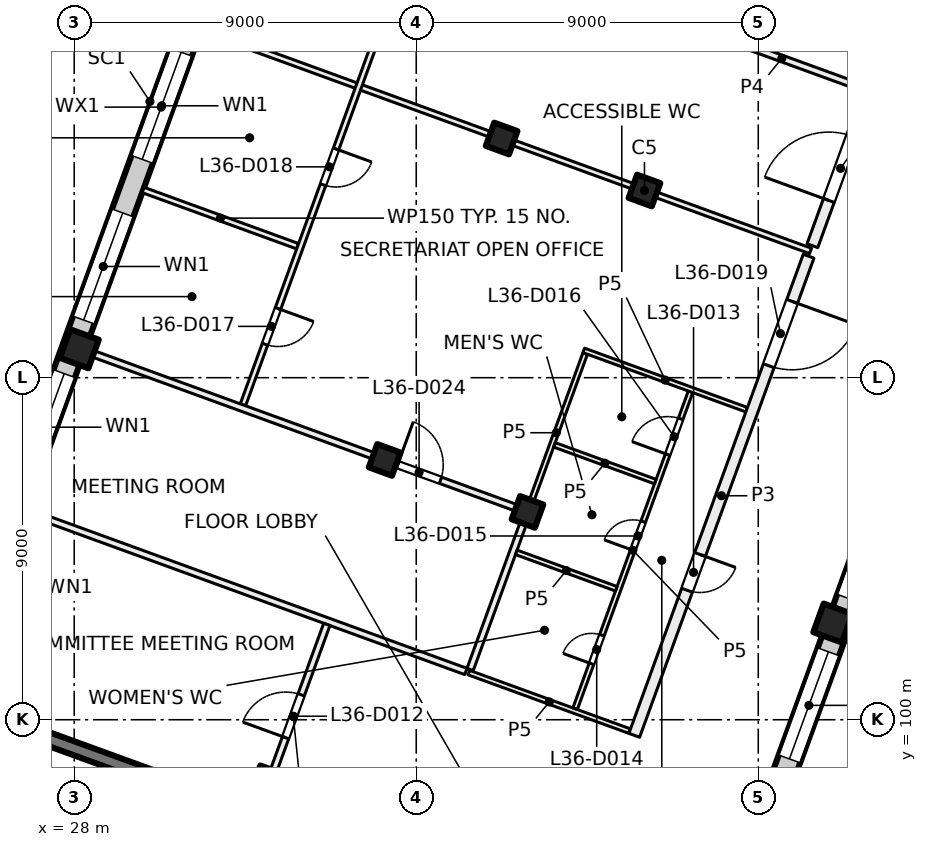
"""IFC4 building model, lengths in metres.
Left out: names, types, materials, properties, quantities, classifications, styles, units other than length and angle.
Written with IfcOpenShell. Run it as: python <this file> out.ifc"""

import sys

from ifc_helpers import new_model, si_unit, direction, frame, frame_2d, origin, origin_2d, place, context, subcontext, project, spatial, rectangle, extrude, element, fill, save


model = new_model("IFC4")
c1 = context("Model", 3, precision=1e-05, world=origin(), true_north=direction((0.0, 1.0)))
c2 = subcontext(c1, "Body", "Model", "MODEL_VIEW")
j1 = project(units=[si_unit("LENGTHUNIT", "METRE"), si_unit("PLANEANGLEUNIT", "RADIAN")], contexts=[c1])
p1 = place(None, origin())
s1 = spatial("IfcSite", under=j1, at=p1, CompositionType="ELEMENT")
p2 = place(p1, origin())
s2 = spatial("IfcBuilding", under=s1, at=p2, CompositionType="ELEMENT")
p3 = place(p2, frame((0.0, 0.0, 154.5)))
s3 = spatial("IfcBuildingStorey", under=s2, at=p3, CompositionType="ELEMENT", Elevation=154.5)
for number, where, z_axis, x_axis in (
    (1, (43.006, 113.925, 0.0), (0.0, 0.0, 1.0), (-0.342, -0.94, 0.0)),
    (2, (39.927, 105.468, 0.0), (0.0, 0.0, 1.0), (-0.342, -0.94, 0.0)),
    (3, (39.247, 115.293, 0.0), (0.0, 0.0, 1.0), (-0.342, -0.94, 0.0)),
    (4, (36.169, 106.836, 0.0), (0.0, 0.0, 1.0), (-0.342, -0.94, 0.0)),
    (5, (33.091, 98.379, 0.0), (0.0, 0.0, 1.0), (-0.342, -0.94, 0.0)),
):
    element("IfcColumn", number, at=place(p3, frame(where, z_axis=z_axis, x_axis=x_axis)), inside=s3, PredefinedType="COLUMN", context=c2, shape_type="SweptSolid", body=[
        extrude(rectangle(XDim=0.65, YDim=0.65, at=origin_2d()), origin(), (0.0, 0.0, 1.0), 4.0),
    ])
for number, where, z_axis, x_axis in (
    (6, (47.962, 102.544, 0.0), (0.0, 0.0, 1.0), (-0.342, -0.94, 0.0)),
    (7, (28.134, 109.76, 0.0), (0.0, 0.0, 1.0), (-0.342, -0.94, 0.0)),
):
    element("IfcColumn", number, at=place(p3, frame(where, z_axis=z_axis, x_axis=x_axis)), inside=s3, PredefinedType="COLUMN", context=c2, shape_type="SweptSolid", body=[
        extrude(rectangle(XDim=0.8, YDim=0.8, at=origin_2d()), origin(), (0.0, 0.0, 1.0), 4.0),
    ])
p4 = place(p3, frame((32.962, 97.441, 0.0), z_axis=(0.0, 0.0, 1.0), x_axis=(-0.939689545667, 0.342028592028, 0.0)))
e8 = element("IfcWall", 8, at=p4, inside=s3, PredefinedType="SHEAR", context=c2, shape_type="SweptSolid", body=[
    extrude(rectangle(XDim=8.65, YDim=0.35, at=frame_2d((4.325, 0.0))), origin(), (0.0, 0.0, 1.0), 4.0),
])
p5 = place(p3, frame((52.212, 113.783, 0.0), z_axis=(0.0, 0.0, 1.0), x_axis=(-0.34202521188, -0.939690775968, 0.0)))
e9 = element("IfcWall", 9, at=p5, inside=s3, PredefinedType="SOLIDWALL", context=c2, shape_type="SweptSolid", body=[
    extrude(rectangle(XDim=21.745, YDim=0.6, at=frame_2d((10.873, 0.0))), origin(), (0.0, 0.0, 1.0), 3.625),
])
p6 = place(p5, frame((4.365, 0.0, 0.0)))
e10 = element("IfcOpeningElement", 10, at=p6, cuts=e9, PredefinedType="OPENING", context=c2, shape_type="SweptSolid", body=[
    extrude(rectangle(XDim=1.8, YDim=2.4, at=frame_2d((0.9, 1.2))), frame((0.0, 0.31, 0.0), z_axis=(0.0, -1.0, 0.0), x_axis=(1.0, 0.0, 0.0)), (0.0, 0.0, 1.0), 0.62),
])
p7 = place(p5, frame((8.265, 0.0, 0.9)))
e11 = element("IfcOpeningElement", 11, at=p7, cuts=e9, PredefinedType="OPENING", context=c2, shape_type="SweptSolid", body=[
    extrude(rectangle(XDim=3.0, YDim=2.4, at=frame_2d((1.5, 1.2))), frame((0.0, 0.31, 0.0), z_axis=(0.0, -1.0, 0.0), x_axis=(1.0, 0.0, 0.0)), (0.0, 0.0, 1.0), 0.62),
])
p8 = place(p5, frame((12.765, 0.0, 0.9)))
e12 = element("IfcOpeningElement", 12, at=p8, cuts=e9, PredefinedType="OPENING", context=c2, shape_type="SweptSolid", body=[
    extrude(rectangle(XDim=3.0, YDim=2.4, at=frame_2d((1.5, 1.2))), frame((0.0, 0.31, 0.0), z_axis=(0.0, -1.0, 0.0), x_axis=(1.0, 0.0, 0.0)), (0.0, 0.0, 1.0), 0.62),
])
p9 = place(p5, frame((17.265, 0.0, 0.9)))
e13 = element("IfcOpeningElement", 13, at=p9, cuts=e9, PredefinedType="OPENING", context=c2, shape_type="SweptSolid", body=[
    extrude(rectangle(XDim=3.0, YDim=2.4, at=frame_2d((1.5, 1.2))), frame((0.0, 0.31, 0.0), z_axis=(0.0, -1.0, 0.0), x_axis=(1.0, 0.0, 0.0)), (0.0, 0.0, 1.0), 0.62),
])
p10 = place(p3, frame((24.666, 100.669, 0.0), z_axis=(0.0, 0.0, 1.0), x_axis=(0.34201964167, 0.939692803373, 0.0)))
e14 = element("IfcWall", 14, at=p10, inside=s3, PredefinedType="SOLIDWALL", context=c2, shape_type="SweptSolid", body=[
    extrude(rectangle(XDim=32.884, YDim=0.6, at=frame_2d((16.442, 0.0))), origin(), (0.0, 0.0, 1.0), 3.625),
])
p11 = place(p10, frame((1.48, 0.0, 0.9)))
e15 = element("IfcOpeningElement", 15, at=p11, cuts=e14, PredefinedType="OPENING", context=c2, shape_type="SweptSolid", body=[
    extrude(rectangle(XDim=3.0, YDim=2.4, at=frame_2d((1.5, 1.2))), frame((0.0, 0.31, 0.0), z_axis=(0.0, -1.0, 0.0), x_axis=(1.0, 0.0, 0.0)), (0.0, 0.0, 1.0), 0.62),
])
p12 = place(p10, frame((5.98, 0.0, 0.9)))
e16 = element("IfcOpeningElement", 16, at=p12, cuts=e14, PredefinedType="OPENING", context=c2, shape_type="SweptSolid", body=[
    extrude(rectangle(XDim=3.0, YDim=2.4, at=frame_2d((1.5, 1.2))), frame((0.0, 0.31, 0.0), z_axis=(0.0, -1.0, 0.0), x_axis=(1.0, 0.0, 0.0)), (0.0, 0.0, 1.0), 0.62),
])
p13 = place(p10, frame((10.48, 0.0, 0.9)))
e17 = element("IfcOpeningElement", 17, at=p13, cuts=e14, PredefinedType="OPENING", context=c2, shape_type="SweptSolid", body=[
    extrude(rectangle(XDim=3.0, YDim=2.4, at=frame_2d((1.5, 1.2))), frame((0.0, 0.31, 0.0), z_axis=(0.0, -1.0, 0.0), x_axis=(1.0, 0.0, 0.0)), (0.0, 0.0, 1.0), 0.62),
])
p14 = place(p10, frame((14.98, 0.0, 0.9)))
e18 = element("IfcOpeningElement", 18, at=p14, cuts=e14, PredefinedType="OPENING", context=c2, shape_type="SweptSolid", body=[
    extrude(rectangle(XDim=3.0, YDim=2.4, at=frame_2d((1.5, 1.2))), frame((0.0, 0.31, 0.0), z_axis=(0.0, -1.0, 0.0), x_axis=(1.0, 0.0, 0.0)), (0.0, 0.0, 1.0), 0.62),
])
p15 = place(p10, frame((20.08, 0.0, 0.0)))
e19 = element("IfcOpeningElement", 19, at=p15, cuts=e14, PredefinedType="OPENING", context=c2, shape_type="SweptSolid", body=[
    extrude(rectangle(XDim=1.8, YDim=2.4, at=frame_2d((0.9, 1.2))), frame((0.0, 0.31, 0.0), z_axis=(0.0, -1.0, 0.0), x_axis=(1.0, 0.0, 0.0)), (0.0, 0.0, 1.0), 0.62),
])
p16 = place(p10, frame((23.98, 0.0, 0.9)))
e20 = element("IfcOpeningElement", 20, at=p16, cuts=e14, PredefinedType="OPENING", context=c2, shape_type="SweptSolid", body=[
    extrude(rectangle(XDim=3.0, YDim=2.4, at=frame_2d((1.5, 1.2))), frame((0.0, 0.31, 0.0), z_axis=(0.0, -1.0, 0.0), x_axis=(1.0, 0.0, 0.0)), (0.0, 0.0, 1.0), 0.62),
])
p17 = place(p10, frame((28.48, 0.0, 0.9)))
e21 = element("IfcOpeningElement", 21, at=p17, cuts=e14, PredefinedType="OPENING", context=c2, shape_type="SweptSolid", body=[
    extrude(rectangle(XDim=3.0, YDim=2.4, at=frame_2d((1.5, 1.2))), frame((0.0, 0.31, 0.0), z_axis=(0.0, -1.0, 0.0), x_axis=(1.0, 0.0, 0.0)), (0.0, 0.0, 1.0), 0.62),
])
p18 = place(p3, frame((28.037, 96.893, 0.0), z_axis=(0.0, 0.0, 1.0), x_axis=(0.342043138314, 0.939684250976, 0.0)))
e22 = element("IfcWall", 22, at=p18, inside=s3, PredefinedType="PARTITIONING", context=c2, shape_type="SweptSolid", body=[
    extrude(rectangle(XDim=2.025, YDim=0.1, at=frame_2d((1.012, 0.0))), origin(), (0.0, 0.0, 1.0), 3.625),
])
p19 = place(p3, frame((26.736, 105.48, 0.0), z_axis=(0.0, 0.0, 1.0), x_axis=(0.939721611154, -0.341940482438, 0.0)))
e23 = element("IfcWall", 23, at=p19, inside=s3, PredefinedType="PARTITIONING", context=c2, shape_type="SweptSolid", body=[
    extrude(rectangle(XDim=12.312, YDim=0.175, at=frame_2d((6.156, 0.0))), origin(), (0.0, 0.0, 1.0), 3.625),
])
p20 = place(p3, frame((29.814, 113.938, 0.0), z_axis=(0.0, 0.0, 1.0), x_axis=(0.93973078783, -0.341915262023, 0.0)))
e24 = element("IfcWall", 24, at=p20, inside=s3, PredefinedType="PARTITIONING", context=c2, shape_type="SweptSolid", body=[
    extrude(rectangle(XDim=4.326, YDim=0.15, at=frame_2d((2.163, 0.0))), origin(), (0.0, 0.0, 1.0), 3.625),
])
p21 = place(p3, frame((31.353, 118.166, 0.0), z_axis=(0.0, 0.0, 1.0), x_axis=(0.939701413127, -0.341995985602, 0.0)))
e25 = element("IfcWall", 25, at=p21, inside=s3, PredefinedType="PARTITIONING", context=c2, shape_type="SweptSolid", body=[
    extrude(rectangle(XDim=17.05, YDim=0.15, at=frame_2d((8.525, 0.0))), origin(), (0.0, 0.0, 1.0), 3.625),
])
p22 = place(p3, frame((37.053, 120.96, 0.0), z_axis=(0.0, 0.0, 1.0), x_axis=(-0.342023551531, -0.939691380293, 0.0)))
e26 = element("IfcWall", 26, at=p22, inside=s3, PredefinedType="PARTITIONING", context=c2, shape_type="SweptSolid", body=[
    extrude(rectangle(XDim=13.488, YDim=0.15, at=frame_2d((6.744, 0.0))), origin(), (0.0, 0.0, 1.0), 3.625),
])
p23 = place(p22, frame((10.791, 0.0, 0.0)))
e27 = element("IfcOpeningElement", 27, at=p23, cuts=e26, PredefinedType="OPENING", context=c2, shape_type="SweptSolid", body=[
    extrude(rectangle(XDim=1.0, YDim=2.1, at=frame_2d((0.5, 1.05))), frame((0.0, 0.085, 0.0), z_axis=(0.0, -1.0, 0.0), x_axis=(1.0, 0.0, 0.0)), (0.0, 0.0, 1.0), 0.17),
])
p24 = place(p22, frame((6.324, 0.0, 0.0)))
e28 = element("IfcOpeningElement", 28, at=p24, cuts=e26, PredefinedType="OPENING", context=c2, shape_type="SweptSolid", body=[
    extrude(rectangle(XDim=1.0, YDim=2.1, at=frame_2d((0.5, 1.05))), frame((0.0, 0.085, 0.0), z_axis=(0.0, -1.0, 0.0), x_axis=(1.0, 0.0, 0.0)), (0.0, 0.0, 1.0), 0.17),
])
p25 = place(p22, frame((1.824, 0.0, 0.0)))
e29 = element("IfcOpeningElement", 29, at=p25, cuts=e26, PredefinedType="OPENING", context=c2, shape_type="SweptSolid", body=[
    extrude(rectangle(XDim=1.0, YDim=2.1, at=frame_2d((0.5, 1.05))), frame((0.0, 0.085, 0.0), z_axis=(0.0, -1.0, 0.0), x_axis=(1.0, 0.0, 0.0)), (0.0, 0.0, 1.0), 0.17),
])
p26 = place(p3, frame((32.881, 97.657, 0.0), z_axis=(0.0, 0.0, 1.0), x_axis=(0.342058204353, 0.939678766832, 0.0)))
e30 = element("IfcWall", 30, at=p26, inside=s3, PredefinedType="PARTITIONING", context=c2, shape_type="SweptSolid", body=[
    extrude(rectangle(XDim=5.163, YDim=0.175, at=frame_2d((2.581, 0.0))), origin(), (0.0, 0.0, 1.0), 3.625),
])
p27 = place(p26, frame((1.991, 0.0, 0.0)))
e31 = element("IfcOpeningElement", 31, at=p27, cuts=e30, PredefinedType="OPENING", context=c2, shape_type="SweptSolid", body=[
    extrude(rectangle(XDim=1.2, YDim=2.1, at=frame_2d((0.6, 1.05))), frame((0.0, 0.097, 0.0), z_axis=(0.0, -1.0, 0.0), x_axis=(1.0, 0.0, 0.0)), (0.0, 0.0, 1.0), 0.195),
])
p28 = place(p3, frame((38.385, 101.24, 0.0), z_axis=(0.0, 0.0, 1.0), x_axis=(0.939711088937, -0.341969398235, 0.0)))
e32 = element("IfcWall", 32, at=p28, inside=s3, PredefinedType="PARTITIONING", context=c2, shape_type="SweptSolid", body=[
    extrude(rectangle(XDim=4.503, YDim=0.125, at=frame_2d((2.252, 0.0))), origin(), (0.0, 0.0, 1.0), 3.625),
])
p29 = place(p3, frame((38.418, 101.322, 0.0), z_axis=(0.0, 0.0, 1.0), x_axis=(0.341987815327, 0.939704386585, 0.0)))
e33 = element("IfcWall", 33, at=p29, inside=s3, PredefinedType="PARTITIONING", context=c2, shape_type="SweptSolid", body=[
    extrude(rectangle(XDim=4.325, YDim=0.175, at=frame_2d((2.162, 0.0))), origin(), (0.0, 0.0, 1.0), 3.625),
])
p30 = place(p3, frame((39.926, 105.465, 0.0), z_axis=(0.0, 0.0, 1.0), x_axis=(0.342263852659, 0.93960388205, 0.0)))
e34 = element("IfcWall", 34, at=p30, inside=s3, PredefinedType="PARTITIONING", context=c2, shape_type="SweptSolid", body=[
    extrude(rectangle(XDim=4.441, YDim=0.125, at=frame_2d((2.221, 0.0))), origin(), (0.0, 0.0, 1.0), 3.625),
])
p31 = place(p3, frame((28.275, 109.709, 0.0), z_axis=(0.0, 0.0, 1.0), x_axis=(0.939698441386, -0.342004150936, 0.0)))
e35 = element("IfcWall", 35, at=p31, inside=s3, PredefinedType="PARTITIONING", context=c2, shape_type="SweptSolid", body=[
    extrude(rectangle(XDim=12.312, YDim=0.175, at=frame_2d((6.156, 0.0))), origin(), (0.0, 0.0, 1.0), 3.625),
])
p32 = place(p31, frame((8.765, 0.0, 0.0)))
e36 = element("IfcOpeningElement", 36, at=p32, cuts=e35, PredefinedType="OPENING", context=c2, shape_type="SweptSolid", body=[
    extrude(rectangle(XDim=1.2, YDim=2.1, at=frame_2d((0.6, 1.05))), frame((0.0, 0.097, 0.0), z_axis=(0.0, -1.0, 0.0), x_axis=(1.0, 0.0, 0.0)), (0.0, 0.0, 1.0), 0.195),
])
p33 = place(p3, frame((41.181, 100.29, 0.0), z_axis=(0.0, 0.0, 1.0), x_axis=(0.34222012082, 0.939619810831, 0.0)))
e37 = element("IfcWall", 37, at=p33, inside=s3, PredefinedType="PARTITIONING", context=c2, shape_type="SweptSolid", body=[
    extrude(rectangle(XDim=8.875, YDim=0.125, at=frame_2d((4.438, 0.0))), origin(), (0.0, 0.0, 1.0), 3.625),
])
p34 = place(p33, frame((1.258, 0.0, 0.0)))
e38 = element("IfcOpeningElement", 38, at=p34, cuts=e37, PredefinedType="OPENING", context=c2, shape_type="SweptSolid", body=[
    extrude(rectangle(XDim=0.8, YDim=2.1, at=frame_2d((0.4, 1.05))), frame((0.0, 0.073, 0.0), z_axis=(0.0, -1.0, 0.0), x_axis=(1.0, 0.0, 0.0)), (0.0, 0.0, 1.0), 0.145),
])
p35 = place(p33, frame((4.437, 0.0, 0.0)))
e39 = element("IfcOpeningElement", 39, at=p35, cuts=e37, PredefinedType="OPENING", context=c2, shape_type="SweptSolid", body=[
    extrude(rectangle(XDim=0.8, YDim=2.1, at=frame_2d((0.4, 1.05))), frame((0.0, 0.073, 0.0), z_axis=(0.0, -1.0, 0.0), x_axis=(1.0, 0.0, 0.0)), (0.0, 0.0, 1.0), 0.145),
])
p36 = place(p33, frame((7.116, 0.0, 0.0)))
e40 = element("IfcOpeningElement", 40, at=p36, cuts=e37, PredefinedType="OPENING", context=c2, shape_type="SweptSolid", body=[
    extrude(rectangle(XDim=1.0, YDim=2.1, at=frame_2d((0.5, 1.05))), frame((0.0, 0.073, 0.0), z_axis=(0.0, -1.0, 0.0), x_axis=(1.0, 0.0, 0.0)), (0.0, 0.0, 1.0), 0.145),
])
p37 = place(p3, frame((41.408, 109.718, 0.0), z_axis=(0.0, 0.0, 1.0), x_axis=(0.939646475447, -0.3421469, 0.0)))
e41 = element("IfcWall", 41, at=p37, inside=s3, PredefinedType="PARTITIONING", context=c2, shape_type="SweptSolid", body=[
    extrude(rectangle(XDim=4.562, YDim=0.125, at=frame_2d((2.281, 0.0))), origin(), (0.0, 0.0, 1.0), 3.625),
])
p38 = place(p3, frame((42.264, 103.446, 0.0), z_axis=(0.0, 0.0, 1.0), x_axis=(-0.939640574808, 0.342163104635, 0.0)))
e42 = element("IfcWall", 42, at=p38, inside=s3, PredefinedType="PARTITIONING", context=c2, shape_type="SweptSolid", body=[
    extrude(rectangle(XDim=2.8, YDim=0.125, at=frame_2d((1.4, 0.0))), origin(), (0.0, 0.0, 1.0), 3.625),
])
p39 = place(p3, frame((47.325, 112.197, 0.0), z_axis=(0.0, 0.0, 1.0), x_axis=(-0.341976837053, -0.93970838185, 0.0)))
e43 = element("IfcWall", 43, at=p39, inside=s3, PredefinedType="PARTITIONING", context=c2, shape_type="SweptSolid", body=[
    extrude(rectangle(XDim=13.416, YDim=0.3, at=frame_2d((6.708, 0.0))), origin(), (0.0, 0.0, 1.0), 3.625),
])
p40 = place(p39, frame((8.354, 0.0, 0.0)))
e44 = element("IfcOpeningElement", 44, at=p40, cuts=e43, PredefinedType="OPENING", context=c2, shape_type="SweptSolid", body=[
    extrude(rectangle(XDim=1.0, YDim=2.1, at=frame_2d((0.5, 1.05))), frame((0.0, 0.16, 0.0), z_axis=(0.0, -1.0, 0.0), x_axis=(1.0, 0.0, 0.0)), (0.0, 0.0, 1.0), 0.32),
])
p41 = place(p39, frame((1.267, 0.0, 0.0)))
e45 = element("IfcOpeningElement", 45, at=p41, cuts=e43, PredefinedType="OPENING", context=c2, shape_type="SweptSolid", body=[
    extrude(rectangle(XDim=1.8, YDim=2.1, at=frame_2d((0.9, 1.05))), frame((0.0, 0.16, 0.0), z_axis=(0.0, -1.0, 0.0), x_axis=(1.0, 0.0, 0.0)), (0.0, 0.0, 1.0), 0.32),
])
p42 = place(p3, frame((43.29, 106.266, 0.0), z_axis=(0.0, 0.0, 1.0), x_axis=(-0.939601484935, 0.342270433294, 0.0)))
e46 = element("IfcWall", 46, at=p42, inside=s3, PredefinedType="PARTITIONING", context=c2, shape_type="SweptSolid", body=[
    extrude(rectangle(XDim=2.825, YDim=0.125, at=frame_2d((1.412, 0.0))), origin(), (0.0, 0.0, 1.0), 3.625),
])
p43 = place(p3, frame((44.463, 118.184, 0.0), z_axis=(0.0, 0.0, 1.0), x_axis=(0.939667480086, -0.342089208934, 0.0)))
e47 = element("IfcWall", 47, at=p43, inside=s3, PredefinedType="PARTITIONING", context=c2, shape_type="SweptSolid", body=[
    extrude(rectangle(XDim=4.587, YDim=0.175, at=frame_2d((2.293, 0.0))), origin(), (0.0, 0.0, 1.0), 3.625),
])
p44 = place(p3, frame((47.425, 112.473, 0.0), z_axis=(0.0, 0.0, 1.0), x_axis=(0.342087569587, 0.939668076894, 0.0)))
e48 = element("IfcWall", 48, at=p44, inside=s3, PredefinedType="PARTITIONING", context=c2, shape_type="SweptSolid", body=[
    extrude(rectangle(XDim=9.445, YDim=0.3, at=frame_2d((4.722, 0.0))), origin(), (0.0, 0.0, 1.0), 3.625),
])
p45 = place(p44, frame((6.003, 0.0, 0.0)))
e49 = element("IfcOpeningElement", 49, at=p45, cuts=e48, PredefinedType="OPENING", context=c2, shape_type="SweptSolid", body=[
    extrude(rectangle(XDim=1.2, YDim=2.1, at=frame_2d((0.6, 1.05))), frame((0.0, 0.16, 0.0), z_axis=(0.0, -1.0, 0.0), x_axis=(1.0, 0.0, 0.0)), (0.0, 0.0, 1.0), 0.32),
])
p46 = place(p44, frame((1.267, 0.0, 0.0)))
e50 = element("IfcOpeningElement", 50, at=p46, cuts=e48, PredefinedType="OPENING", context=c2, shape_type="SweptSolid", body=[
    extrude(rectangle(XDim=1.8, YDim=2.1, at=frame_2d((0.9, 1.05))), frame((0.0, 0.16, 0.0), z_axis=(0.0, -1.0, 0.0), x_axis=(1.0, 0.0, 0.0)), (0.0, 0.0, 1.0), 0.32),
])
p47 = place(p7, origin())
e51 = element("IfcWindow", 51, at=p47, inside=s3, PartitioningType="SINGLE_PANEL", PredefinedType="WINDOW", context=c2, shape_type="SweptSolid", body=[
    extrude(rectangle(XDim=3.0, YDim=2.4, at=frame_2d((1.5, 1.2))), frame((0.0, 0.03, 0.0), z_axis=(0.0, -1.0, 0.0), x_axis=(1.0, 0.0, 0.0)), (0.0, 0.0, 1.0), 0.06),
])
fill(e11, e51)
p48 = place(p8, origin())
e52 = element("IfcWindow", 52, at=p48, inside=s3, PartitioningType="SINGLE_PANEL", PredefinedType="WINDOW", context=c2, shape_type="SweptSolid", body=[
    extrude(rectangle(XDim=3.0, YDim=2.4, at=frame_2d((1.5, 1.2))), frame((0.0, 0.03, 0.0), z_axis=(0.0, -1.0, 0.0), x_axis=(1.0, 0.0, 0.0)), (0.0, 0.0, 1.0), 0.06),
])
fill(e12, e52)
p49 = place(p12, origin())
e53 = element("IfcWindow", 53, at=p49, inside=s3, PartitioningType="SINGLE_PANEL", PredefinedType="WINDOW", context=c2, shape_type="SweptSolid", body=[
    extrude(rectangle(XDim=3.0, YDim=2.4, at=frame_2d((1.5, 1.2))), frame((0.0, 0.03, 0.0), z_axis=(0.0, -1.0, 0.0), x_axis=(1.0, 0.0, 0.0)), (0.0, 0.0, 1.0), 0.06),
])
fill(e16, e53)
p50 = place(p13, origin())
e54 = element("IfcWindow", 54, at=p50, inside=s3, PartitioningType="SINGLE_PANEL", PredefinedType="WINDOW", context=c2, shape_type="SweptSolid", body=[
    extrude(rectangle(XDim=3.0, YDim=2.4, at=frame_2d((1.5, 1.2))), frame((0.0, 0.03, 0.0), z_axis=(0.0, -1.0, 0.0), x_axis=(1.0, 0.0, 0.0)), (0.0, 0.0, 1.0), 0.06),
])
fill(e17, e54)
p51 = place(p14, origin())
e55 = element("IfcWindow", 55, at=p51, inside=s3, PartitioningType="SINGLE_PANEL", PredefinedType="WINDOW", context=c2, shape_type="SweptSolid", body=[
    extrude(rectangle(XDim=3.0, YDim=2.4, at=frame_2d((1.5, 1.2))), frame((0.0, 0.03, 0.0), z_axis=(0.0, -1.0, 0.0), x_axis=(1.0, 0.0, 0.0)), (0.0, 0.0, 1.0), 0.06),
])
fill(e18, e55)
p52 = place(p27, origin())
e56 = element("IfcDoor", 56, at=p52, inside=s3, OperationType="DOUBLE_DOOR_SINGLE_SWING", PredefinedType="DOOR", context=c2, shape_type="SweptSolid", body=[
    extrude(rectangle(XDim=1.2, YDim=2.1, at=frame_2d((0.6, 1.05))), frame((0.0, 0.025, 0.0), z_axis=(0.0, -1.0, 0.0), x_axis=(1.0, 0.0, 0.0)), (0.0, 0.0, 1.0), 0.05),
])
fill(e31, e56)
p53 = place(p40, origin())
e57 = element("IfcDoor", 57, at=p53, inside=s3, OperationType="SINGLE_SWING_LEFT", PredefinedType="DOOR", context=c2, shape_type="SweptSolid", body=[
    extrude(rectangle(XDim=1.0, YDim=2.1, at=frame_2d((0.5, 1.05))), frame((0.0, 0.025, 0.0), z_axis=(0.0, -1.0, 0.0), x_axis=(1.0, 0.0, 0.0)), (0.0, 0.0, 1.0), 0.05),
])
fill(e44, e57)
p54 = place(p34, origin())
e58 = element("IfcDoor", 58, at=p54, inside=s3, OperationType="SINGLE_SWING_LEFT", PredefinedType="DOOR", context=c2, shape_type="SweptSolid", body=[
    extrude(rectangle(XDim=0.8, YDim=2.1, at=frame_2d((0.4, 1.05))), frame((0.0, 0.025, 0.0), z_axis=(0.0, -1.0, 0.0), x_axis=(1.0, 0.0, 0.0)), (0.0, 0.0, 1.0), 0.05),
])
fill(e38, e58)
p55 = place(p35, origin())
e59 = element("IfcDoor", 59, at=p55, inside=s3, OperationType="SINGLE_SWING_LEFT", PredefinedType="DOOR", context=c2, shape_type="SweptSolid", body=[
    extrude(rectangle(XDim=0.8, YDim=2.1, at=frame_2d((0.4, 1.05))), frame((0.0, 0.025, 0.0), z_axis=(0.0, -1.0, 0.0), x_axis=(1.0, 0.0, 0.0)), (0.0, 0.0, 1.0), 0.05),
])
fill(e39, e59)
p56 = place(p36, origin())
e60 = element("IfcDoor", 60, at=p56, inside=s3, OperationType="SINGLE_SWING_LEFT", PredefinedType="DOOR", context=c2, shape_type="SweptSolid", body=[
    extrude(rectangle(XDim=1.0, YDim=2.1, at=frame_2d((0.5, 1.05))), frame((0.0, 0.025, 0.0), z_axis=(0.0, -1.0, 0.0), x_axis=(1.0, 0.0, 0.0)), (0.0, 0.0, 1.0), 0.05),
])
fill(e40, e60)
p57 = place(p23, origin())
e61 = element("IfcDoor", 61, at=p57, inside=s3, OperationType="SINGLE_SWING_LEFT", PredefinedType="DOOR", context=c2, shape_type="SweptSolid", body=[
    extrude(rectangle(XDim=1.0, YDim=2.1, at=frame_2d((0.5, 1.05))), frame((0.0, 0.025, 0.0), z_axis=(0.0, -1.0, 0.0), x_axis=(1.0, 0.0, 0.0)), (0.0, 0.0, 1.0), 0.05),
])
fill(e27, e61)
p58 = place(p24, origin())
e62 = element("IfcDoor", 62, at=p58, inside=s3, OperationType="SINGLE_SWING_RIGHT", PredefinedType="DOOR", context=c2, shape_type="SweptSolid", body=[
    extrude(rectangle(XDim=1.0, YDim=2.1, at=frame_2d((0.5, 1.05))), frame((0.0, 0.025, 0.0), z_axis=(0.0, -1.0, 0.0), x_axis=(1.0, 0.0, 0.0)), (0.0, 0.0, 1.0), 0.05),
])
fill(e28, e62)
p59 = place(p41, origin())
e63 = element("IfcDoor", 63, at=p59, inside=s3, OperationType="DOUBLE_DOOR_SINGLE_SWING", PredefinedType="DOOR", context=c2, shape_type="SweptSolid", body=[
    extrude(rectangle(XDim=1.8, YDim=2.1, at=frame_2d((0.9, 1.05))), frame((0.0, 0.025, 0.0), z_axis=(0.0, -1.0, 0.0), x_axis=(1.0, 0.0, 0.0)), (0.0, 0.0, 1.0), 0.05),
])
fill(e45, e63)
p60 = place(p46, origin())
e64 = element("IfcDoor", 64, at=p60, inside=s3, OperationType="DOUBLE_DOOR_SINGLE_SWING", PredefinedType="DOOR", context=c2, shape_type="SweptSolid", body=[
    extrude(rectangle(XDim=1.8, YDim=2.1, at=frame_2d((0.9, 1.05))), frame((0.0, 0.025, 0.0), z_axis=(0.0, -1.0, 0.0), x_axis=(1.0, 0.0, 0.0)), (0.0, 0.0, 1.0), 0.05),
])
fill(e50, e64)
p61 = place(p32, origin())
e65 = element("IfcDoor", 65, at=p61, inside=s3, OperationType="DOUBLE_DOOR_SINGLE_SWING", PredefinedType="DOOR", context=c2, shape_type="SweptSolid", body=[
    extrude(rectangle(XDim=1.2, YDim=2.1, at=frame_2d((0.6, 1.05))), frame((0.0, 0.025, 0.0), z_axis=(0.0, -1.0, 0.0), x_axis=(1.0, 0.0, 0.0)), (0.0, 0.0, 1.0), 0.05),
])
fill(e36, e65)
save(model, sys.argv[1])
